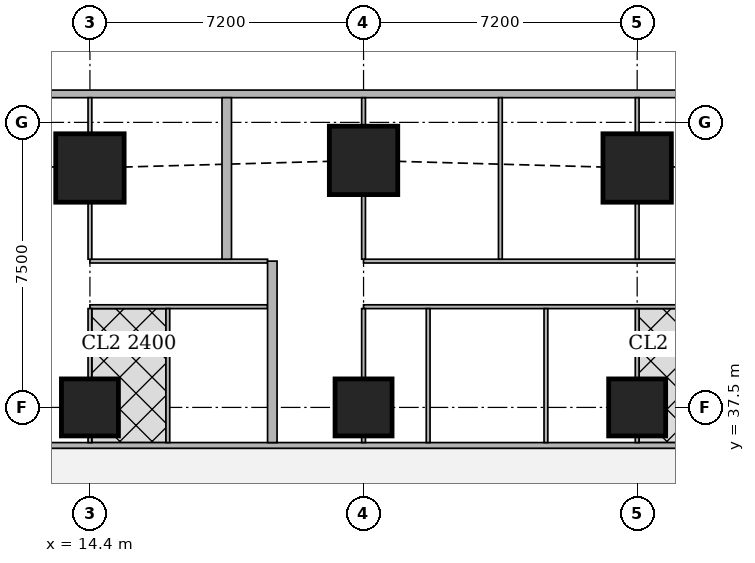
"""IFC4 building model, lengths in metres.
Left out: names, types, materials, properties, quantities, classifications, styles, units other than length and angle.
Written with IfcOpenShell. Run it as: python <this file> out.ifc"""

import sys

from ifc_helpers import new_model, si_unit, direction, frame, frame_2d, origin, origin_2d, place, context, subcontext, project, spatial, rectangle, extrude, element, fill, save


model = new_model("IFC4")
c1 = context("Model", 3, precision=1e-05, world=origin(), true_north=direction((0.0, 1.0)))
c2 = subcontext(c1, "Body", "Model", "MODEL_VIEW")
j1 = project(units=[si_unit("LENGTHUNIT", "METRE"), si_unit("PLANEANGLEUNIT", "RADIAN")], contexts=[c1])
p1 = place(None, origin())
s1 = spatial("IfcSite", under=j1, at=p1, CompositionType="ELEMENT")
p2 = place(p1, origin())
s2 = spatial("IfcBuilding", under=s1, at=p2, CompositionType="ELEMENT")
p3 = place(p2, frame((0.0, 0.0, 158.3)))
s3 = spatial("IfcBuildingStorey", under=s2, at=p3, CompositionType="ELEMENT", Elevation=158.3)
for number, where, z_axis, x_axis in (
    (1, (14.4, 37.5, 0.0), (0.0, 0.0, 1.0), (1.0, 0.0, 0.0)),
    (2, (21.6, 37.5, 0.0), (0.0, 0.0, 1.0), (1.0, 0.0, 0.0)),
    (3, (28.8, 37.5, 0.0), (0.0, 0.0, 1.0), (1.0, 0.0, 0.0)),
):
    element("IfcColumn", number, at=place(p3, frame(where, z_axis=z_axis, x_axis=x_axis)), inside=s3, PredefinedType="COLUMN", context=c2, shape_type="SweptSolid", body=[
        extrude(rectangle(XDim=1.5, YDim=1.5, at=origin_2d()), origin(), (0.0, 0.0, 1.0), 3.75),
    ])
for number, where, z_axis, x_axis in (
    (4, (14.4, 43.8, 0.0), (0.0, 0.0, 1.0), (1.0, 0.0, 0.0)),
    (5, (21.6, 44.0, 0.0), (0.0, 0.0, 1.0), (1.0, 0.0, 0.0)),
    (6, (28.8, 43.8, 0.0), (0.0, 0.0, 1.0), (1.0, 0.0, 0.0)),
):
    element("IfcColumn", number, at=place(p3, frame(where, z_axis=z_axis, x_axis=x_axis)), inside=s3, PredefinedType="COLUMN", context=c2, shape_type="SweptSolid", body=[
        extrude(rectangle(XDim=1.8, YDim=1.8, at=origin_2d()), origin(), (0.0, 0.0, 1.0), 3.75),
    ])
p4 = place(p3, frame((40.106, 45.75, 0.0), z_axis=(0.0, 0.0, 1.0), x_axis=(-1.0, 0.0, 0.0)))
e7 = element("IfcWall", 7, at=p4, inside=s3, PredefinedType="SOLIDWALL", context=c2, shape_type="SweptSolid", body=[
    extrude(rectangle(XDim=37.943, YDim=0.2, at=frame_2d((18.971, 0.0))), origin(), (0.0, 0.0, 1.0), 3.5),
])
p5 = place(p4, frame((8.606, 0.0, 0.9)))
e8 = element("IfcOpeningElement", 8, at=p5, cuts=e7, PredefinedType="OPENING", context=c2, shape_type="SweptSolid", body=[
    extrude(rectangle(XDim=1.8, YDim=1.5, at=frame_2d((0.9, 0.75))), frame((0.0, 0.11, 0.0), z_axis=(0.0, -1.0, 0.0), x_axis=(1.0, 0.0, 0.0)), (0.0, 0.0, 1.0), 0.22),
])
p6 = place(p4, frame((12.206, 0.0, 0.9)))
e9 = element("IfcOpeningElement", 9, at=p6, cuts=e7, PredefinedType="OPENING", context=c2, shape_type="SweptSolid", body=[
    extrude(rectangle(XDim=1.8, YDim=1.5, at=frame_2d((0.9, 0.75))), frame((0.0, 0.11, 0.0), z_axis=(0.0, -1.0, 0.0), x_axis=(1.0, 0.0, 0.0)), (0.0, 0.0, 1.0), 0.22),
])
p7 = place(p4, frame((15.806, 0.0, 0.9)))
e10 = element("IfcOpeningElement", 10, at=p7, cuts=e7, PredefinedType="OPENING", context=c2, shape_type="SweptSolid", body=[
    extrude(rectangle(XDim=1.8, YDim=1.5, at=frame_2d((0.9, 0.75))), frame((0.0, 0.11, 0.0), z_axis=(0.0, -1.0, 0.0), x_axis=(1.0, 0.0, 0.0)), (0.0, 0.0, 1.0), 0.22),
])
p8 = place(p4, frame((19.406, 0.0, 0.9)))
e11 = element("IfcOpeningElement", 11, at=p8, cuts=e7, PredefinedType="OPENING", context=c2, shape_type="SweptSolid", body=[
    extrude(rectangle(XDim=1.8, YDim=1.5, at=frame_2d((0.9, 0.75))), frame((0.0, 0.11, 0.0), z_axis=(0.0, -1.0, 0.0), x_axis=(1.0, 0.0, 0.0)), (0.0, 0.0, 1.0), 0.22),
])
p9 = place(p4, frame((23.006, 0.0, 0.9)))
e12 = element("IfcOpeningElement", 12, at=p9, cuts=e7, PredefinedType="OPENING", context=c2, shape_type="SweptSolid", body=[
    extrude(rectangle(XDim=1.8, YDim=1.5, at=frame_2d((0.9, 0.75))), frame((0.0, 0.11, 0.0), z_axis=(0.0, -1.0, 0.0), x_axis=(1.0, 0.0, 0.0)), (0.0, 0.0, 1.0), 0.22),
])
p10 = place(p4, frame((26.606, 0.0, 0.9)))
e13 = element("IfcOpeningElement", 13, at=p10, cuts=e7, PredefinedType="OPENING", context=c2, shape_type="SweptSolid", body=[
    extrude(rectangle(XDim=1.8, YDim=1.5, at=frame_2d((0.9, 0.75))), frame((0.0, 0.11, 0.0), z_axis=(0.0, -1.0, 0.0), x_axis=(1.0, 0.0, 0.0)), (0.0, 0.0, 1.0), 0.22),
])
p11 = place(p3, frame((8.35, 36.5, 0.0), z_axis=(0.0, 0.0, 1.0), x_axis=(1.0, 0.0, 0.0)))
e14 = element("IfcWall", 14, at=p11, inside=s3, PredefinedType="SOLIDWALL", context=c2, shape_type="SweptSolid", body=[
    extrude(rectangle(XDim=26.415, YDim=0.15, at=frame_2d((13.208, 0.0))), origin(), (0.0, 0.0, 1.0), 3.5),
])
p12 = place(p11, frame((2.6, 0.0, 0.0)))
e15 = element("IfcOpeningElement", 15, at=p12, cuts=e14, PredefinedType="OPENING", context=c2, shape_type="SweptSolid", body=[
    extrude(rectangle(XDim=1.0, YDim=2.1, at=frame_2d((0.5, 1.05))), frame((0.0, 0.085, 0.0), z_axis=(0.0, -1.0, 0.0), x_axis=(1.0, 0.0, 0.0)), (0.0, 0.0, 1.0), 0.17),
])
p13 = place(p11, frame((10.949, 0.0, 0.0)))
e16 = element("IfcOpeningElement", 16, at=p13, cuts=e14, PredefinedType="OPENING", context=c2, shape_type="SweptSolid", body=[
    extrude(rectangle(XDim=1.0, YDim=2.1, at=frame_2d((0.5, 1.05))), frame((0.0, 0.085, 0.0), z_axis=(0.0, -1.0, 0.0), x_axis=(1.0, 0.0, 0.0)), (0.0, 0.0, 1.0), 0.17),
])
p14 = place(p3, frame((14.4, 41.35, 0.0), z_axis=(0.0, 0.0, 1.0), x_axis=(1.0, 0.0, 0.0)))
e17 = element("IfcWall", 17, at=p14, inside=s3, PredefinedType="PARTITIONING", context=c2, shape_type="SweptSolid", body=[
    extrude(rectangle(XDim=4.674, YDim=0.1, at=frame_2d((2.337, 0.0))), origin(), (0.0, 0.0, 1.0), 3.5),
])
p15 = place(p14, frame((0.2, 0.0, 0.0)))
e18 = element("IfcOpeningElement", 18, at=p15, cuts=e17, PredefinedType="OPENING", context=c2, shape_type="SweptSolid", body=[
    extrude(rectangle(XDim=0.9, YDim=2.1, at=frame_2d((0.45, 1.05))), frame((0.0, 0.06, 0.0), z_axis=(0.0, -1.0, 0.0), x_axis=(1.0, 0.0, 0.0)), (0.0, 0.0, 1.0), 0.12),
])
p16 = place(p3, frame((14.4, 40.15, 0.0), z_axis=(0.0, 0.0, 1.0), x_axis=(1.0, 0.0, 0.0)))
e19 = element("IfcWall", 19, at=p16, inside=s3, PredefinedType="PARTITIONING", context=c2, shape_type="SweptSolid", body=[
    extrude(rectangle(XDim=4.674, YDim=0.1, at=frame_2d((2.337, 0.0))), origin(), (0.0, 0.0, 1.0), 3.5),
])
p17 = place(p16, frame((0.575, 0.0, 0.0)))
e20 = element("IfcOpeningElement", 20, at=p17, cuts=e19, PredefinedType="OPENING", context=c2, shape_type="SweptSolid", body=[
    extrude(rectangle(XDim=0.9, YDim=2.1, at=frame_2d((0.45, 1.05))), frame((0.0, 0.06, 0.0), z_axis=(0.0, -1.0, 0.0), x_axis=(1.0, 0.0, 0.0)), (0.0, 0.0, 1.0), 0.12),
])
p18 = place(p16, frame((2.975, 0.0, 0.0)))
e21 = element("IfcOpeningElement", 21, at=p18, cuts=e19, PredefinedType="OPENING", context=c2, shape_type="SweptSolid", body=[
    extrude(rectangle(XDim=0.9, YDim=2.1, at=frame_2d((0.45, 1.05))), frame((0.0, 0.06, 0.0), z_axis=(0.0, -1.0, 0.0), x_axis=(1.0, 0.0, 0.0)), (0.0, 0.0, 1.0), 0.12),
])
p19 = place(p3, frame((14.4, 41.4, 0.0), z_axis=(0.0, 0.0, 1.0), x_axis=(0.0, 1.0, 0.0)))
e22 = element("IfcWall", 22, at=p19, inside=s3, PredefinedType="PARTITIONING", context=c2, shape_type="SweptSolid", body=[
    extrude(rectangle(XDim=1.499, YDim=0.1, at=frame_2d((0.75, 0.0))), origin(), (0.0, 0.0, 1.0), 3.5),
])
p20 = place(p3, frame((14.4, 44.701, 0.0), z_axis=(0.0, 0.0, 1.0), x_axis=(0.0, 1.0, 0.0)))
e23 = element("IfcWall", 23, at=p20, inside=s3, PredefinedType="PARTITIONING", context=c2, shape_type="SweptSolid", body=[
    extrude(rectangle(XDim=0.949, YDim=0.1, at=frame_2d((0.475, 0.0))), origin(), (0.0, 0.0, 1.0), 3.5),
])
p21 = place(p3, frame((14.4, 36.575, 0.0), z_axis=(0.0, 0.0, 1.0), x_axis=(0.0, 1.0, 0.0)))
e24 = element("IfcWall", 24, at=p21, inside=s3, PredefinedType="PARTITIONING", context=c2, shape_type="SweptSolid", body=[
    extrude(rectangle(XDim=0.174, YDim=0.1, at=frame_2d((0.087, 0.0))), origin(), (0.0, 0.0, 1.0), 3.5),
])
p22 = place(p3, frame((14.4, 38.251, 0.0), z_axis=(0.0, 0.0, 1.0), x_axis=(0.0, 1.0, 0.0)))
e25 = element("IfcWall", 25, at=p22, inside=s3, PredefinedType="PARTITIONING", context=c2, shape_type="SweptSolid", body=[
    extrude(rectangle(XDim=1.849, YDim=0.1, at=frame_2d((0.925, 0.0))), origin(), (0.0, 0.0, 1.0), 3.5),
])
p23 = place(p3, frame((16.45, 36.575, 0.0), z_axis=(0.0, 0.0, 1.0), x_axis=(0.0, 1.0, 0.0)))
e26 = element("IfcWall", 26, at=p23, inside=s3, PredefinedType="PARTITIONING", context=c2, shape_type="SweptSolid", body=[
    extrude(rectangle(XDim=3.525, YDim=0.1, at=frame_2d((1.763, 0.0))), origin(), (0.0, 0.0, 1.0), 3.5),
])
p24 = place(p3, frame((21.6, 41.35, 0.0), z_axis=(0.0, 0.0, 1.0), x_axis=(1.0, 0.0, 0.0)))
e27 = element("IfcWall", 27, at=p24, inside=s3, PredefinedType="PARTITIONING", context=c2, shape_type="SweptSolid", body=[
    extrude(rectangle(XDim=12.253, YDim=0.1, at=frame_2d((6.126, 0.0))), origin(), (0.0, 0.0, 1.0), 3.5),
])
p25 = place(p24, frame((0.2, 0.0, 0.0)))
e28 = element("IfcOpeningElement", 28, at=p25, cuts=e27, PredefinedType="OPENING", context=c2, shape_type="SweptSolid", body=[
    extrude(rectangle(XDim=0.9, YDim=2.1, at=frame_2d((0.45, 1.05))), frame((0.0, 0.06, 0.0), z_axis=(0.0, -1.0, 0.0), x_axis=(1.0, 0.0, 0.0)), (0.0, 0.0, 1.0), 0.12),
])
p26 = place(p24, frame((3.8, 0.0, 0.0)))
e29 = element("IfcOpeningElement", 29, at=p26, cuts=e27, PredefinedType="OPENING", context=c2, shape_type="SweptSolid", body=[
    extrude(rectangle(XDim=0.9, YDim=2.1, at=frame_2d((0.45, 1.05))), frame((0.0, 0.06, 0.0), z_axis=(0.0, -1.0, 0.0), x_axis=(1.0, 0.0, 0.0)), (0.0, 0.0, 1.0), 0.12),
])
p27 = place(p24, frame((7.4, 0.0, 0.0)))
e30 = element("IfcOpeningElement", 30, at=p27, cuts=e27, PredefinedType="OPENING", context=c2, shape_type="SweptSolid", body=[
    extrude(rectangle(XDim=0.9, YDim=2.1, at=frame_2d((0.45, 1.05))), frame((0.0, 0.06, 0.0), z_axis=(0.0, -1.0, 0.0), x_axis=(1.0, 0.0, 0.0)), (0.0, 0.0, 1.0), 0.12),
])
p28 = place(p3, frame((21.6, 40.15, 0.0), z_axis=(0.0, 0.0, 1.0), x_axis=(1.0, 0.0, 0.0)))
e31 = element("IfcWall", 31, at=p28, inside=s3, PredefinedType="PARTITIONING", context=c2, shape_type="SweptSolid", body=[
    extrude(rectangle(XDim=12.48, YDim=0.1, at=frame_2d((6.24, 0.0))), origin(), (0.0, 0.0, 1.0), 3.5),
])
p29 = place(p28, frame((0.4, 0.0, 0.0)))
e32 = element("IfcOpeningElement", 32, at=p29, cuts=e31, PredefinedType="OPENING", context=c2, shape_type="SweptSolid", body=[
    extrude(rectangle(XDim=0.9, YDim=2.1, at=frame_2d((0.45, 1.05))), frame((0.0, 0.06, 0.0), z_axis=(0.0, -1.0, 0.0), x_axis=(1.0, 0.0, 0.0)), (0.0, 0.0, 1.0), 0.12),
])
p30 = place(p28, frame((5.549, 0.0, 0.0)))
e33 = element("IfcOpeningElement", 33, at=p30, cuts=e31, PredefinedType="OPENING", context=c2, shape_type="SweptSolid", body=[
    extrude(rectangle(XDim=0.9, YDim=2.1, at=frame_2d((0.45, 1.05))), frame((0.0, 0.06, 0.0), z_axis=(0.0, -1.0, 0.0), x_axis=(1.0, 0.0, 0.0)), (0.0, 0.0, 1.0), 0.12),
])
p31 = place(p28, frame((7.775, 0.0, 0.0)))
e34 = element("IfcOpeningElement", 34, at=p31, cuts=e31, PredefinedType="OPENING", context=c2, shape_type="SweptSolid", body=[
    extrude(rectangle(XDim=0.9, YDim=2.1, at=frame_2d((0.45, 1.05))), frame((0.0, 0.06, 0.0), z_axis=(0.0, -1.0, 0.0), x_axis=(1.0, 0.0, 0.0)), (0.0, 0.0, 1.0), 0.12),
])
p32 = place(p28, frame((11.43, 0.0, 0.0)))
e35 = element("IfcOpeningElement", 35, at=p32, cuts=e31, PredefinedType="OPENING", context=c2, shape_type="SweptSolid", body=[
    extrude(rectangle(XDim=0.9, YDim=2.1, at=frame_2d((0.45, 1.05))), frame((0.0, 0.06, 0.0), z_axis=(0.0, -1.0, 0.0), x_axis=(1.0, 0.0, 0.0)), (0.0, 0.0, 1.0), 0.12),
])
p33 = place(p28, frame((2.799, 0.0, 0.0)))
e36 = element("IfcOpeningElement", 36, at=p33, cuts=e31, PredefinedType="OPENING", context=c2, shape_type="SweptSolid", body=[
    extrude(rectangle(XDim=0.9, YDim=2.1, at=frame_2d((0.45, 1.05))), frame((0.0, 0.06, 0.0), z_axis=(0.0, -1.0, 0.0), x_axis=(1.0, 0.0, 0.0)), (0.0, 0.0, 1.0), 0.12),
])
p34 = place(p28, frame((9.575, 0.0, 0.0)))
e37 = element("IfcOpeningElement", 37, at=p34, cuts=e31, PredefinedType="OPENING", context=c2, shape_type="SweptSolid", body=[
    extrude(rectangle(XDim=0.9, YDim=2.1, at=frame_2d((0.45, 1.05))), frame((0.0, 0.06, 0.0), z_axis=(0.0, -1.0, 0.0), x_axis=(1.0, 0.0, 0.0)), (0.0, 0.0, 1.0), 0.12),
])
p35 = place(p3, frame((21.6, 41.4, 0.0), z_axis=(0.0, 0.0, 1.0), x_axis=(0.0, 1.0, 0.0)))
e38 = element("IfcWall", 38, at=p35, inside=s3, PredefinedType="PARTITIONING", context=c2, shape_type="SweptSolid", body=[
    extrude(rectangle(XDim=1.699, YDim=0.1, at=frame_2d((0.85, 0.0))), origin(), (0.0, 0.0, 1.0), 3.5),
])
p36 = place(p3, frame((21.6, 44.901, 0.0), z_axis=(0.0, 0.0, 1.0), x_axis=(0.0, 1.0, 0.0)))
e39 = element("IfcWall", 39, at=p36, inside=s3, PredefinedType="PARTITIONING", context=c2, shape_type="SweptSolid", body=[
    extrude(rectangle(XDim=0.749, YDim=0.1, at=frame_2d((0.375, 0.0))), origin(), (0.0, 0.0, 1.0), 3.5),
])
p37 = place(p3, frame((25.2, 41.4, 0.0), z_axis=(0.0, 0.0, 1.0), x_axis=(0.0, 1.0, 0.0)))
e40 = element("IfcWall", 40, at=p37, inside=s3, PredefinedType="PARTITIONING", context=c2, shape_type="SweptSolid", body=[
    extrude(rectangle(XDim=4.25, YDim=0.1, at=frame_2d((2.125, 0.0))), origin(), (0.0, 0.0, 1.0), 2.1),
])
p38 = place(p3, frame((28.8, 41.4, 0.0), z_axis=(0.0, 0.0, 1.0), x_axis=(0.0, 1.0, 0.0)))
e41 = element("IfcWall", 41, at=p38, inside=s3, PredefinedType="PARTITIONING", context=c2, shape_type="SweptSolid", body=[
    extrude(rectangle(XDim=1.499, YDim=0.1, at=frame_2d((0.75, 0.0))), origin(), (0.0, 0.0, 1.0), 3.5),
])
p39 = place(p3, frame((28.8, 44.701, 0.0), z_axis=(0.0, 0.0, 1.0), x_axis=(0.0, 1.0, 0.0)))
e42 = element("IfcWall", 42, at=p39, inside=s3, PredefinedType="PARTITIONING", context=c2, shape_type="SweptSolid", body=[
    extrude(rectangle(XDim=0.949, YDim=0.1, at=frame_2d((0.475, 0.0))), origin(), (0.0, 0.0, 1.0), 3.5),
])
p40 = place(p3, frame((21.6, 36.575, 0.0), z_axis=(0.0, 0.0, 1.0), x_axis=(0.0, 1.0, 0.0)))
e43 = element("IfcWall", 43, at=p40, inside=s3, PredefinedType="PARTITIONING", context=c2, shape_type="SweptSolid", body=[
    extrude(rectangle(XDim=0.174, YDim=0.1, at=frame_2d((0.087, 0.0))), origin(), (0.0, 0.0, 1.0), 3.5),
])
p41 = place(p3, frame((21.6, 38.251, 0.0), z_axis=(0.0, 0.0, 1.0), x_axis=(0.0, 1.0, 0.0)))
e44 = element("IfcWall", 44, at=p41, inside=s3, PredefinedType="PARTITIONING", context=c2, shape_type="SweptSolid", body=[
    extrude(rectangle(XDim=1.849, YDim=0.1, at=frame_2d((0.925, 0.0))), origin(), (0.0, 0.0, 1.0), 3.5),
])
p42 = place(p3, frame((26.399, 36.575, 0.0), z_axis=(0.0, 0.0, 1.0), x_axis=(0.0, 1.0, 0.0)))
e45 = element("IfcWall", 45, at=p42, inside=s3, PredefinedType="PARTITIONING", context=c2, shape_type="SweptSolid", body=[
    extrude(rectangle(XDim=3.525, YDim=0.1, at=frame_2d((1.763, 0.0))), origin(), (0.0, 0.0, 1.0), 3.5),
])
p43 = place(p3, frame((28.8, 36.575, 0.0), z_axis=(0.0, 0.0, 1.0), x_axis=(0.0, 1.0, 0.0)))
e46 = element("IfcWall", 46, at=p43, inside=s3, PredefinedType="PARTITIONING", context=c2, shape_type="SweptSolid", body=[
    extrude(rectangle(XDim=0.174, YDim=0.1, at=frame_2d((0.087, 0.0))), origin(), (0.0, 0.0, 1.0), 3.5),
])
p44 = place(p3, frame((28.8, 38.251, 0.0), z_axis=(0.0, 0.0, 1.0), x_axis=(0.0, 1.0, 0.0)))
e47 = element("IfcWall", 47, at=p44, inside=s3, PredefinedType="PARTITIONING", context=c2, shape_type="SweptSolid", body=[
    extrude(rectangle(XDim=1.849, YDim=0.1, at=frame_2d((0.925, 0.0))), origin(), (0.0, 0.0, 1.0), 3.5),
])
p45 = place(p3, frame((23.3, 36.575, 0.0), z_axis=(0.0, 0.0, 1.0), x_axis=(0.0, 1.0, 0.0)))
e48 = element("IfcWall", 48, at=p45, inside=s3, PredefinedType="PARTITIONING", context=c2, shape_type="SweptSolid", body=[
    extrude(rectangle(XDim=3.525, YDim=0.1, at=frame_2d((1.763, 0.0))), origin(), (0.0, 0.0, 1.0), 3.5),
])
p46 = place(p3, frame((18.0, 41.4, 0.0), z_axis=(0.0, 0.0, 1.0), x_axis=(0.0, 1.0, 0.0)))
e49 = element("IfcWall", 49, at=p46, inside=s3, PredefinedType="SOLIDWALL", context=c2, shape_type="SweptSolid", body=[
    extrude(rectangle(XDim=4.25, YDim=0.25, at=frame_2d((2.125, 0.0))), origin(), (0.0, 0.0, 1.0), 2.1),
])
p47 = place(p3, frame((19.199, 36.575, 0.0), z_axis=(0.0, 0.0, 1.0), x_axis=(0.0, 1.0, 0.0)))
e50 = element("IfcWall", 50, at=p47, inside=s3, PredefinedType="SOLIDWALL", context=c2, shape_type="SweptSolid", body=[
    extrude(rectangle(XDim=4.775, YDim=0.25, at=frame_2d((2.388, 0.0))), origin(), (0.0, 0.0, 1.0), 3.5),
])
p48 = place(p5, origin())
e51 = element("IfcWindow", 51, at=p48, inside=s3, PartitioningType="SINGLE_PANEL", PredefinedType="WINDOW", context=c2, shape_type="SweptSolid", body=[
    extrude(rectangle(XDim=1.8, YDim=1.5, at=frame_2d((0.9, 0.75))), frame((0.0, 0.03, 0.0), z_axis=(0.0, -1.0, 0.0), x_axis=(1.0, 0.0, 0.0)), (0.0, 0.0, 1.0), 0.06),
])
fill(e8, e51)
p49 = place(p6, origin())
e52 = element("IfcWindow", 52, at=p49, inside=s3, PartitioningType="SINGLE_PANEL", PredefinedType="WINDOW", context=c2, shape_type="SweptSolid", body=[
    extrude(rectangle(XDim=1.8, YDim=1.5, at=frame_2d((0.9, 0.75))), frame((0.0, 0.03, 0.0), z_axis=(0.0, -1.0, 0.0), x_axis=(1.0, 0.0, 0.0)), (0.0, 0.0, 1.0), 0.06),
])
fill(e9, e52)
p50 = place(p7, origin())
e53 = element("IfcWindow", 53, at=p50, inside=s3, PartitioningType="SINGLE_PANEL", PredefinedType="WINDOW", context=c2, shape_type="SweptSolid", body=[
    extrude(rectangle(XDim=1.8, YDim=1.5, at=frame_2d((0.9, 0.75))), frame((0.0, 0.03, 0.0), z_axis=(0.0, -1.0, 0.0), x_axis=(1.0, 0.0, 0.0)), (0.0, 0.0, 1.0), 0.06),
])
fill(e10, e53)
p51 = place(p8, origin())
e54 = element("IfcWindow", 54, at=p51, inside=s3, PartitioningType="SINGLE_PANEL", PredefinedType="WINDOW", context=c2, shape_type="SweptSolid", body=[
    extrude(rectangle(XDim=1.8, YDim=1.5, at=frame_2d((0.9, 0.75))), frame((0.0, 0.03, 0.0), z_axis=(0.0, -1.0, 0.0), x_axis=(1.0, 0.0, 0.0)), (0.0, 0.0, 1.0), 0.06),
])
fill(e11, e54)
p52 = place(p9, origin())
e55 = element("IfcWindow", 55, at=p52, inside=s3, PartitioningType="SINGLE_PANEL", PredefinedType="WINDOW", context=c2, shape_type="SweptSolid", body=[
    extrude(rectangle(XDim=1.8, YDim=1.5, at=frame_2d((0.9, 0.75))), frame((0.0, 0.03, 0.0), z_axis=(0.0, -1.0, 0.0), x_axis=(1.0, 0.0, 0.0)), (0.0, 0.0, 1.0), 0.06),
])
fill(e12, e55)
p53 = place(p10, origin())
e56 = element("IfcWindow", 56, at=p53, inside=s3, PartitioningType="SINGLE_PANEL", PredefinedType="WINDOW", context=c2, shape_type="SweptSolid", body=[
    extrude(rectangle(XDim=1.8, YDim=1.5, at=frame_2d((0.9, 0.75))), frame((0.0, 0.03, 0.0), z_axis=(0.0, -1.0, 0.0), x_axis=(1.0, 0.0, 0.0)), (0.0, 0.0, 1.0), 0.06),
])
fill(e13, e56)
p54 = place(p15, origin())
e57 = element("IfcDoor", 57, at=p54, inside=s3, OperationType="SINGLE_SWING_LEFT", PredefinedType="DOOR", context=c2, shape_type="SweptSolid", body=[
    extrude(rectangle(XDim=0.9, YDim=2.1, at=frame_2d((0.45, 1.05))), frame((0.0, 0.025, 0.0), z_axis=(0.0, -1.0, 0.0), x_axis=(1.0, 0.0, 0.0)), (0.0, 0.0, 1.0), 0.05),
])
fill(e18, e57)
p55 = place(p17, origin())
e58 = element("IfcDoor", 58, at=p55, inside=s3, OperationType="SINGLE_SWING_RIGHT", PredefinedType="DOOR", context=c2, shape_type="SweptSolid", body=[
    extrude(rectangle(XDim=0.9, YDim=2.1, at=frame_2d((0.45, 1.05))), frame((0.0, 0.025, 0.0), z_axis=(0.0, -1.0, 0.0), x_axis=(1.0, 0.0, 0.0)), (0.0, 0.0, 1.0), 0.05),
])
fill(e20, e58)
p56 = place(p18, origin())
e59 = element("IfcDoor", 59, at=p56, inside=s3, OperationType="SINGLE_SWING_LEFT", PredefinedType="DOOR", context=c2, shape_type="SweptSolid", body=[
    extrude(rectangle(XDim=0.9, YDim=2.1, at=frame_2d((0.45, 1.05))), frame((0.0, 0.025, 0.0), z_axis=(0.0, -1.0, 0.0), x_axis=(1.0, 0.0, 0.0)), (0.0, 0.0, 1.0), 0.05),
])
fill(e21, e59)
p57 = place(p25, origin())
e60 = element("IfcDoor", 60, at=p57, inside=s3, OperationType="SINGLE_SWING_LEFT", PredefinedType="DOOR", context=c2, shape_type="SweptSolid", body=[
    extrude(rectangle(XDim=0.9, YDim=2.1, at=frame_2d((0.45, 1.05))), frame((0.0, 0.025, 0.0), z_axis=(0.0, -1.0, 0.0), x_axis=(1.0, 0.0, 0.0)), (0.0, 0.0, 1.0), 0.05),
])
fill(e28, e60)
p58 = place(p26, origin())
e61 = element("IfcDoor", 61, at=p58, inside=s3, OperationType="SINGLE_SWING_LEFT", PredefinedType="DOOR", context=c2, shape_type="SweptSolid", body=[
    extrude(rectangle(XDim=0.9, YDim=2.1, at=frame_2d((0.45, 1.05))), frame((0.0, 0.025, 0.0), z_axis=(0.0, -1.0, 0.0), x_axis=(1.0, 0.0, 0.0)), (0.0, 0.0, 1.0), 0.05),
])
fill(e29, e61)
p59 = place(p27, origin())
e62 = element("IfcDoor", 62, at=p59, inside=s3, OperationType="SINGLE_SWING_LEFT", PredefinedType="DOOR", context=c2, shape_type="SweptSolid", body=[
    extrude(rectangle(XDim=0.9, YDim=2.1, at=frame_2d((0.45, 1.05))), frame((0.0, 0.025, 0.0), z_axis=(0.0, -1.0, 0.0), x_axis=(1.0, 0.0, 0.0)), (0.0, 0.0, 1.0), 0.05),
])
fill(e30, e62)
p60 = place(p29, origin())
e63 = element("IfcDoor", 63, at=p60, inside=s3, OperationType="SINGLE_SWING_RIGHT", PredefinedType="DOOR", context=c2, shape_type="SweptSolid", body=[
    extrude(rectangle(XDim=0.9, YDim=2.1, at=frame_2d((0.45, 1.05))), frame((0.0, 0.025, 0.0), z_axis=(0.0, -1.0, 0.0), x_axis=(1.0, 0.0, 0.0)), (0.0, 0.0, 1.0), 0.05),
])
fill(e32, e63)
p61 = place(p30, origin())
e64 = element("IfcDoor", 64, at=p61, inside=s3, OperationType="SINGLE_SWING_LEFT", PredefinedType="DOOR", context=c2, shape_type="SweptSolid", body=[
    extrude(rectangle(XDim=0.9, YDim=2.1, at=frame_2d((0.45, 1.05))), frame((0.0, 0.025, 0.0), z_axis=(0.0, -1.0, 0.0), x_axis=(1.0, 0.0, 0.0)), (0.0, 0.0, 1.0), 0.05),
])
fill(e33, e64)
p62 = place(p31, origin())
e65 = element("IfcDoor", 65, at=p62, inside=s3, OperationType="SINGLE_SWING_LEFT", PredefinedType="DOOR", context=c2, shape_type="SweptSolid", body=[
    extrude(rectangle(XDim=0.9, YDim=2.1, at=frame_2d((0.45, 1.05))), frame((0.0, 0.025, 0.0), z_axis=(0.0, -1.0, 0.0), x_axis=(1.0, 0.0, 0.0)), (0.0, 0.0, 1.0), 0.05),
])
fill(e34, e65)
p63 = place(p33, origin())
e66 = element("IfcDoor", 66, at=p63, inside=s3, OperationType="SINGLE_SWING_RIGHT", PredefinedType="DOOR", context=c2, shape_type="SweptSolid", body=[
    extrude(rectangle(XDim=0.9, YDim=2.1, at=frame_2d((0.45, 1.05))), frame((0.0, 0.025, 0.0), z_axis=(0.0, -1.0, 0.0), x_axis=(1.0, 0.0, 0.0)), (0.0, 0.0, 1.0), 0.05),
])
fill(e36, e66)
p64 = place(p13, origin())
e67 = element("IfcDoor", 67, at=p64, inside=s3, OperationType="SINGLE_SWING_LEFT", PredefinedType="DOOR", context=c2, shape_type="SweptSolid", body=[
    extrude(rectangle(XDim=1.0, YDim=2.1, at=frame_2d((0.5, 1.05))), frame((0.0, 0.025, 0.0), z_axis=(0.0, -1.0, 0.0), x_axis=(1.0, 0.0, 0.0)), (0.0, 0.0, 1.0), 0.05),
])
fill(e16, e67)
save(model, sys.argv[1])
